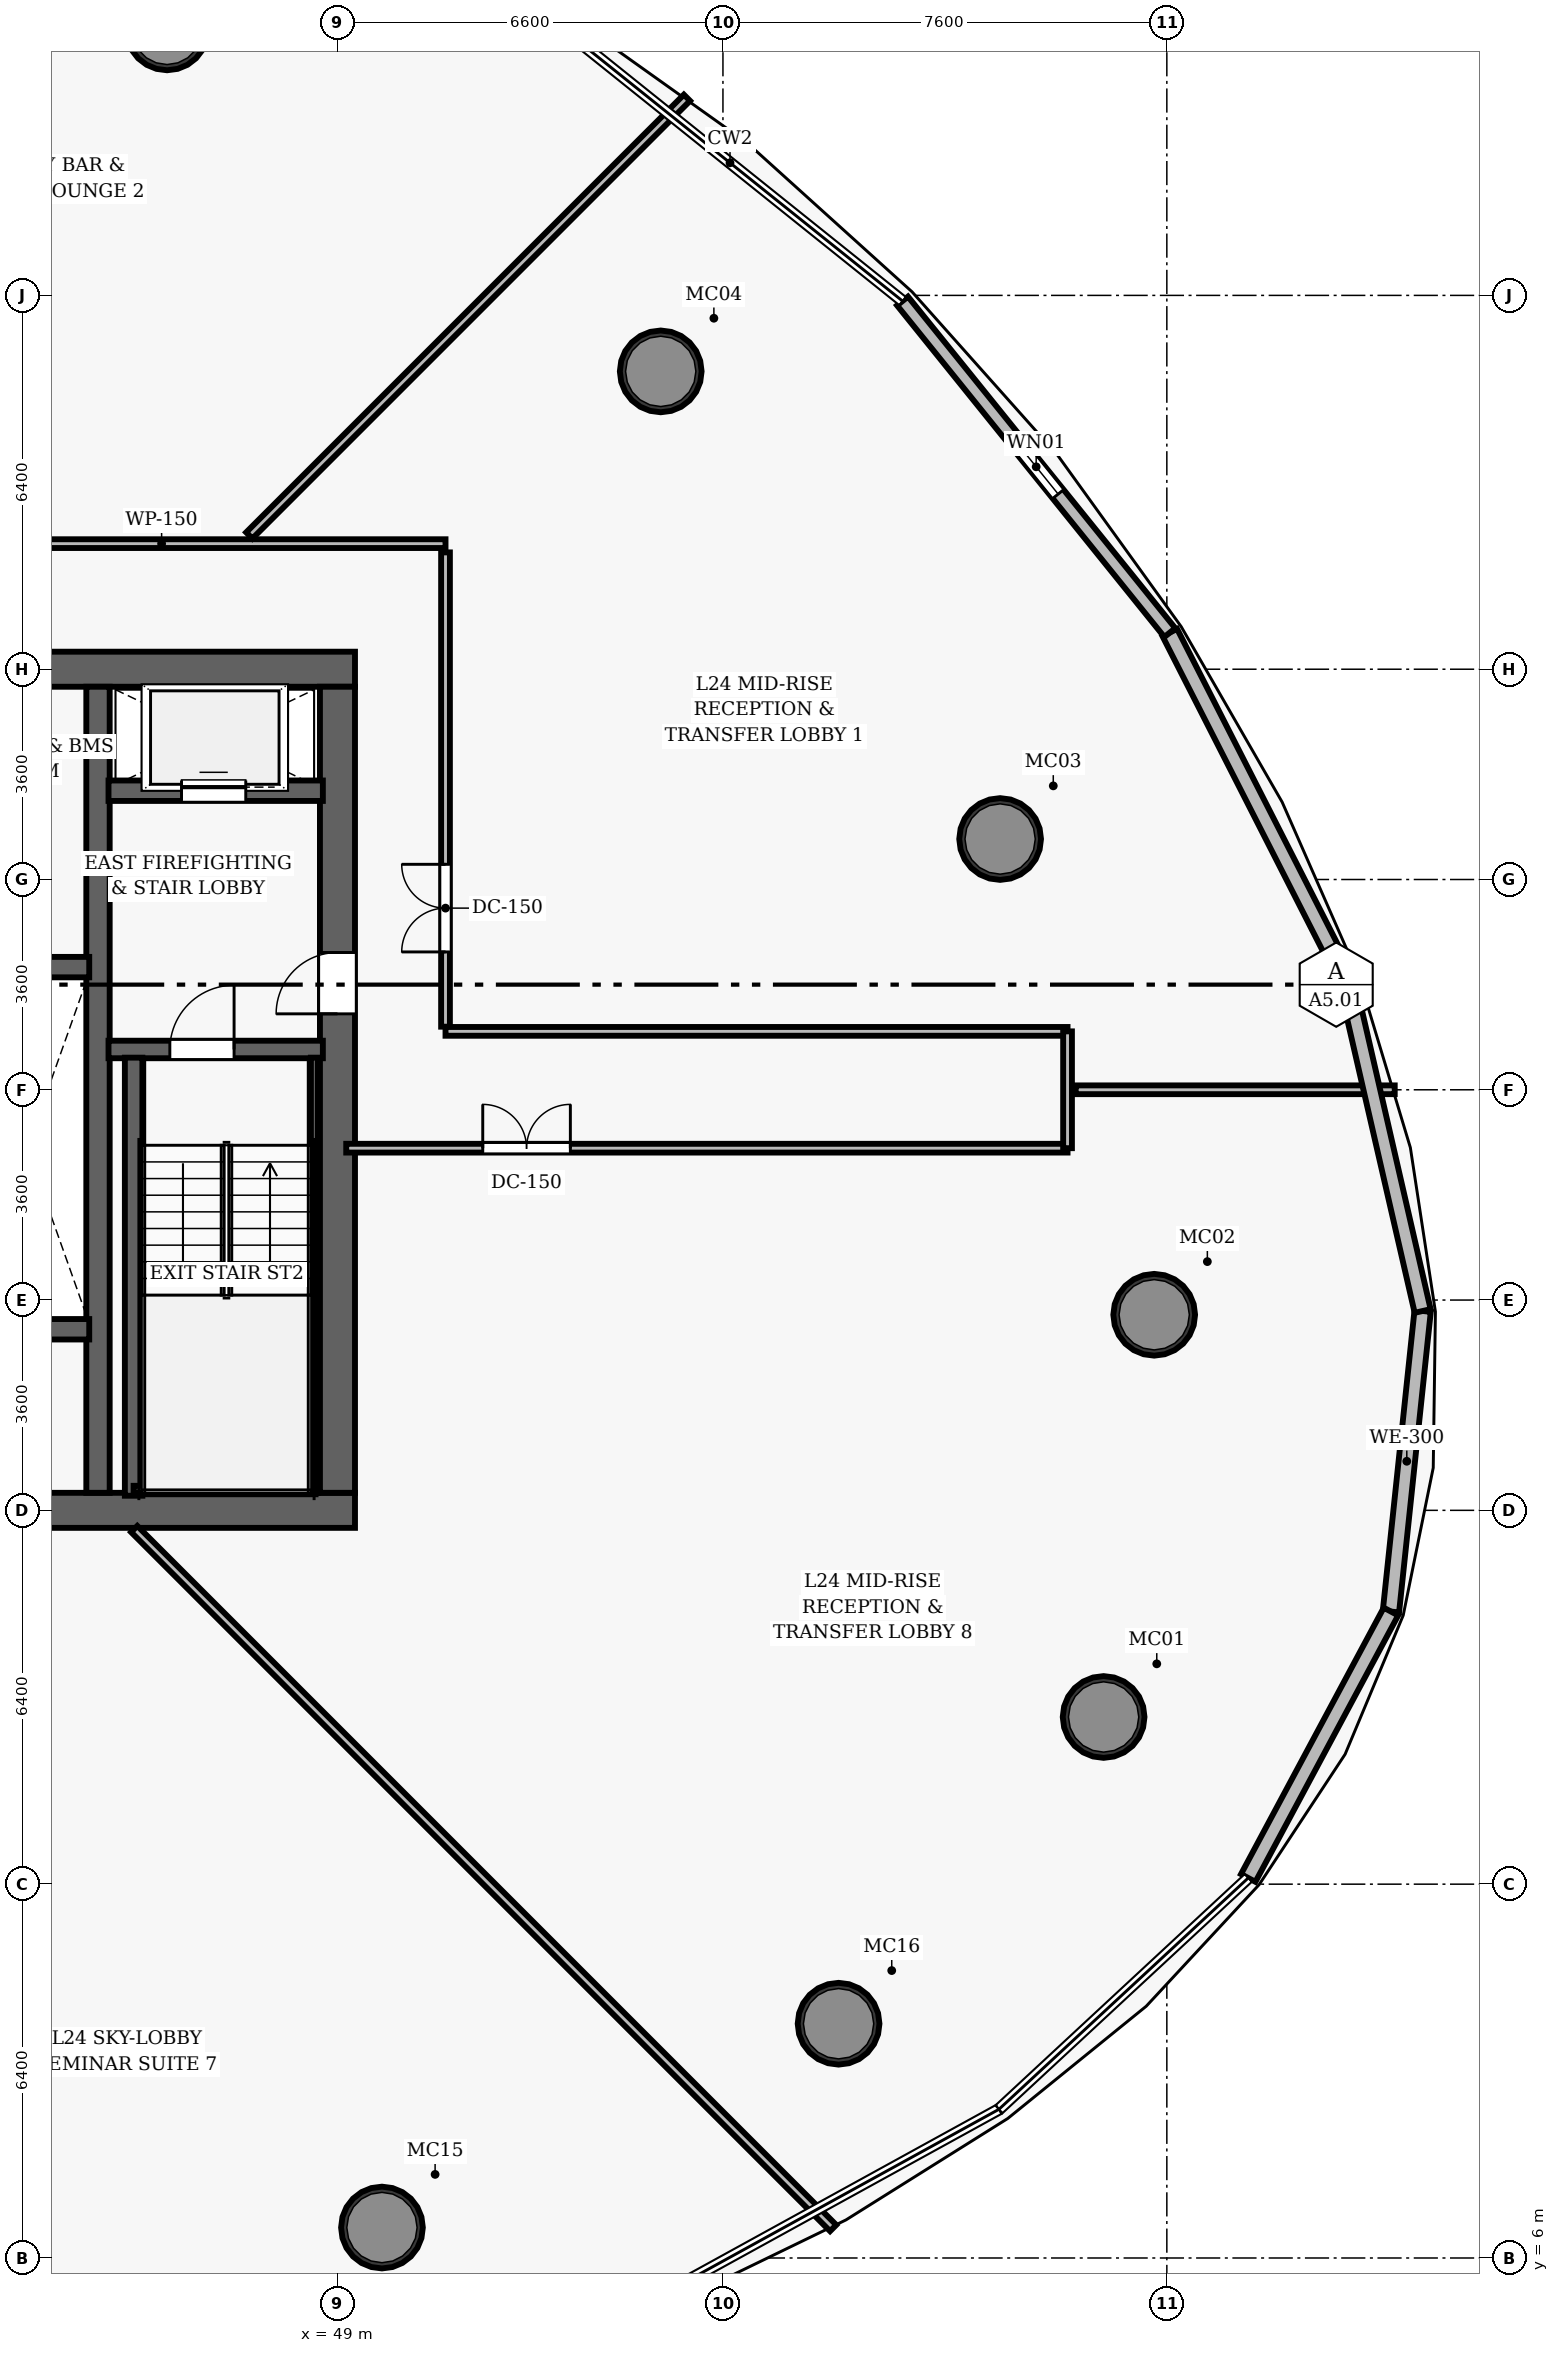
"""IFC4 building model, lengths in metres.
Left out: names, types, materials, properties, quantities, classifications, styles, units other than length and angle.
Written with IfcOpenShell. Run it as: python <this file> out.ifc"""

import sys

from ifc_helpers import new_model, si_unit, direction, frame, frame_2d, origin, origin_2d, place, context, subcontext, project, spatial, rectangle, hollow_circle, extrude, element, fill, save


model = new_model("IFC4")
c1 = context("Model", 3, precision=1e-05, world=origin(), true_north=direction((0.0, 1.0)))
c2 = subcontext(c1, "Body", "Model", "MODEL_VIEW")
j1 = project(units=[si_unit("LENGTHUNIT", "METRE"), si_unit("PLANEANGLEUNIT", "RADIAN")], contexts=[c1])
p1 = place(None, origin())
s1 = spatial("IfcSite", under=j1, at=p1, CompositionType="ELEMENT")
p2 = place(p1, origin())
s2 = spatial("IfcBuilding", under=s1, at=p2, CompositionType="ELEMENT")
p3 = place(p2, frame((0.0, 0.0, 102.8)))
s3 = spatial("IfcBuildingStorey", under=s2, at=p3, CompositionType="ELEMENT", Elevation=102.8)
p4 = place(p3, frame((26.7, 18.8, 0.0), z_axis=(0.0, 0.0, 1.0), x_axis=(1.0, 0.0, 0.0)))
e1 = element("IfcWall", 1, at=p4, inside=s3, PredefinedType="SHEAR", context=c2, shape_type="SweptSolid", body=[
    extrude(rectangle(XDim=22.6, YDim=0.6, at=frame_2d((11.3, 0.0))), origin(), (0.0, 0.0, 1.0), 3.5),
])
p5 = place(p4, frame((14.52, 0.0, 0.0)))
e2 = element("IfcOpeningElement", 2, at=p5, cuts=e1, PredefinedType="OPENING", context=c2, shape_type="SweptSolid", body=[
    extrude(rectangle(XDim=1.05, YDim=2.15, at=frame_2d((0.525, 1.075))), frame((0.0, 0.31, 0.0), z_axis=(0.0, -1.0, 0.0), x_axis=(1.0, 0.0, 0.0)), (0.0, 0.0, 1.0), 0.62),
])
p6 = place(p3, frame((26.7, 33.2, 0.0), z_axis=(0.0, 0.0, 1.0), x_axis=(1.0, 0.0, 0.0)))
e3 = element("IfcWall", 3, at=p6, inside=s3, PredefinedType="SHEAR", context=c2, shape_type="SweptSolid", body=[
    extrude(rectangle(XDim=22.6, YDim=0.6, at=frame_2d((11.3, 0.0))), origin(), (0.0, 0.0, 1.0), 3.5),
])
p7 = place(p6, frame((4.62, 0.0, 0.0)))
e4 = element("IfcOpeningElement", 4, at=p7, cuts=e3, PredefinedType="OPENING", context=c2, shape_type="SweptSolid", body=[
    extrude(rectangle(XDim=1.05, YDim=2.15, at=frame_2d((0.525, 1.075))), frame((0.0, 0.31, 0.0), z_axis=(0.0, -1.0, 0.0), x_axis=(1.0, 0.0, 0.0)), (0.0, 0.0, 1.0), 0.62),
])
p8 = place(p6, frame((14.52, 0.0, 0.0)))
e5 = element("IfcOpeningElement", 5, at=p8, cuts=e3, PredefinedType="OPENING", context=c2, shape_type="SweptSolid", body=[
    extrude(rectangle(XDim=1.05, YDim=2.15, at=frame_2d((0.525, 1.075))), frame((0.0, 0.31, 0.0), z_axis=(0.0, -1.0, 0.0), x_axis=(1.0, 0.0, 0.0)), (0.0, 0.0, 1.0), 0.62),
])
p9 = place(p3, frame((49.0, 19.1, 0.0), z_axis=(0.0, 0.0, 1.0), x_axis=(0.0, 1.0, 0.0)))
e6 = element("IfcWall", 6, at=p9, inside=s3, PredefinedType="SHEAR", context=c2, shape_type="SweptSolid", body=[
    extrude(rectangle(XDim=13.8, YDim=0.6, at=frame_2d((6.9, 0.0))), origin(), (0.0, 0.0, 1.0), 3.5),
])
p10 = place(p9, frame((8.2, 0.0, 0.0)))
e7 = element("IfcOpeningElement", 7, at=p10, cuts=e6, PredefinedType="OPENING", context=c2, shape_type="SweptSolid", body=[
    extrude(rectangle(XDim=1.05, YDim=2.15, at=frame_2d((0.525, 1.075))), frame((0.0, 0.31, 0.0), z_axis=(0.0, -1.0, 0.0), x_axis=(1.0, 0.0, 0.0)), (0.0, 0.0, 1.0), 0.62),
])
p11 = place(p3, frame((44.9, 19.1, 0.0), z_axis=(0.0, 0.0, 1.0), x_axis=(0.0, 1.0, 0.0)))
e8 = element("IfcWall", 8, at=p11, inside=s3, PredefinedType="SHEAR", context=c2, shape_type="SweptSolid", body=[
    extrude(rectangle(XDim=13.8, YDim=0.4, at=frame_2d((6.9, 0.0))), origin(), (0.0, 0.0, 1.0), 3.5),
])
for number, where, z_axis, x_axis in (
    (9, (62.118, 15.262, 0.0), (0.0, 0.0, 1.0), (1.0, 0.0, 0.0)),
    (10, (62.984, 22.148, 0.0), (0.0, 0.0, 1.0), (1.0, 0.0, 0.0)),
    (11, (60.346, 30.293, 0.0), (0.0, 0.0, 1.0), (1.0, 0.0, 0.0)),
    (12, (54.535, 38.299, 0.0), (0.0, 0.0, 1.0), (1.0, 0.0, 0.0)),
    (13, (46.083, 44.154, 0.0), (0.0, 0.0, 1.0), (1.0, 0.0, 0.0)),
    (14, (49.762, 6.521, 0.0), (0.0, 0.0, 1.0), (1.0, 0.0, 0.0)),
    (15, (57.58, 10.011, 0.0), (0.0, 0.0, 1.0), (1.0, 0.0, 0.0)),
):
    element("IfcColumn", number, at=place(p3, frame(where, z_axis=z_axis, x_axis=x_axis)), inside=s3, PredefinedType="COLUMN", context=c2, shape_type="SweptSolid", body=[
        extrude(hollow_circle(Radius=0.7, WallThickness=0.055, at=origin_2d()), origin(), (0.0, 0.0, 1.0), 3.5),
    ])
p12 = place(p3, frame((45.08, 26.69, 0.0), z_axis=(0.0, 0.0, 1.0), x_axis=(1.0, 0.0, 0.0)))
e16 = element("IfcWall", 16, at=p12, inside=s3, PredefinedType="SHEAR", context=c2, shape_type="SweptSolid", body=[
    extrude(rectangle(XDim=3.67, YDim=0.3, at=frame_2d((1.835, 0.0))), origin(), (0.0, 0.0, 1.0), 3.5),
])
p13 = place(p12, frame((1.05, 0.0, 0.0)))
e17 = element("IfcOpeningElement", 17, at=p13, cuts=e16, PredefinedType="OPENING", context=c2, shape_type="SweptSolid", body=[
    extrude(rectangle(XDim=1.1, YDim=2.15, at=frame_2d((0.55, 1.075))), frame((0.0, 0.16, 0.0), z_axis=(0.0, -1.0, 0.0), x_axis=(1.0, 0.0, 0.0)), (0.0, 0.0, 1.0), 0.32),
])
p14 = place(p3, frame((45.51, 19.05, 0.0), z_axis=(0.0, 0.0, 1.0), x_axis=(0.0, 1.0, 0.0)))
e18 = element("IfcWall", 18, at=p14, inside=s3, PredefinedType="SHEAR", context=c2, shape_type="SweptSolid", body=[
    extrude(rectangle(XDim=7.5, YDim=0.3, at=frame_2d((3.75, 0.0))), origin(), (0.0, 0.0, 1.0), 3.5),
])
p15 = place(p3, frame((48.605, 19.1, 0.0), z_axis=(0.0, 0.0, 1.0), x_axis=(0.0, 1.0, 0.0)))
e19 = element("IfcWall", 19, at=p15, inside=s3, PredefinedType="SHEAR", context=c2, shape_type="SweptSolid", body=[
    extrude(rectangle(XDim=7.45, YDim=0.12, at=frame_2d((3.725, 0.0))), origin(), (0.0, 0.0, 1.0), 3.5),
])
p16 = place(p3, frame((45.51, 19.16, 0.0), z_axis=(0.0, 0.0, 1.0), x_axis=(1.0, 0.0, 0.0)))
e20 = element("IfcWall", 20, at=p16, inside=s3, PredefinedType="SHEAR", context=c2, shape_type="SweptSolid", body=[
    extrude(rectangle(XDim=3.095, YDim=0.12, at=frame_2d((1.547, 0.0))), origin(), (0.0, 0.0, 1.0), 3.5),
])
p17 = place(p3, frame((45.08, 31.12, 0.0), z_axis=(0.0, 0.0, 1.0), x_axis=(1.0, 0.0, 0.0)))
e21 = element("IfcWall", 21, at=p17, inside=s3, PredefinedType="SHEAR", context=c2, shape_type="SweptSolid", body=[
    extrude(rectangle(XDim=3.67, YDim=0.35, at=frame_2d((1.835, 0.0))), origin(), (0.0, 0.0, 1.0), 2.675),
])
p18 = place(p17, frame((1.25, 0.0, 0.0)))
e22 = element("IfcOpeningElement", 22, at=p18, cuts=e21, PredefinedType="OPENING", context=c2, shape_type="SweptSolid", body=[
    extrude(rectangle(XDim=1.1, YDim=2.15, at=frame_2d((0.55, 1.075))), frame((0.0, 0.185, 0.0), z_axis=(0.0, -1.0, 0.0), x_axis=(1.0, 0.0, 0.0)), (0.0, 0.0, 1.0), 0.37),
])
for number, where, z_axis, x_axis in (
    (23, (42.72, 21.9, 0.0), (0.0, 0.0, 1.0), (1.0, 0.0, 0.0)),
    (24, (42.72, 28.1, 0.0), (0.0, 0.0, 1.0), (1.0, 0.0, 0.0)),
):
    element("IfcWall", number, at=place(p3, frame(where, z_axis=z_axis, x_axis=x_axis)), inside=s3, PredefinedType="SHEAR", context=c2, shape_type="SweptSolid", body=[
        extrude(rectangle(XDim=2.03, YDim=0.35, at=frame_2d((1.015, 0.0))), origin(), (0.0, 0.0, 1.0), 2.675),
    ])
p19 = place(p3, frame((24.85, 35.35, 0.0), z_axis=(0.0, 0.0, 1.0), x_axis=(1.0, 0.0, 0.0)))
e25 = element("IfcWall", 25, at=p19, inside=s3, PredefinedType="PARTITIONING", context=c2, shape_type="SweptSolid", body=[
    extrude(rectangle(XDim=26.0, YDim=0.15, at=frame_2d((13.0, 0.0))), origin(), (0.0, 0.0, 1.0), 2.675),
])
p20 = place(p19, frame((14.628, 0.0, 0.0)))
e26 = element("IfcOpeningElement", 26, at=p20, cuts=e25, PredefinedType="OPENING", context=c2, shape_type="SweptSolid", body=[
    extrude(rectangle(XDim=1.5, YDim=2.2, at=frame_2d((0.75, 1.1))), frame((0.0, 0.085, 0.0), z_axis=(0.0, -1.0, 0.0), x_axis=(1.0, 0.0, 0.0)), (0.0, 0.0, 1.0), 0.17),
])
p21 = place(p19, frame((6.407, 0.0, 0.0)))
e27 = element("IfcOpeningElement", 27, at=p21, cuts=e25, PredefinedType="OPENING", context=c2, shape_type="SweptSolid", body=[
    extrude(rectangle(XDim=0.95, YDim=2.15, at=frame_2d((0.475, 1.075))), frame((0.0, 0.085, 0.0), z_axis=(0.0, -1.0, 0.0), x_axis=(1.0, 0.0, 0.0)), (0.0, 0.0, 1.0), 0.17),
])
p22 = place(p3, frame((50.85, 27.08, 0.0), z_axis=(0.0, 0.0, 1.0), x_axis=(0.0, 1.0, 0.0)))
e28 = element("IfcWall", 28, at=p22, inside=s3, PredefinedType="PARTITIONING", context=c2, shape_type="SweptSolid", body=[
    extrude(rectangle(XDim=8.12, YDim=0.15, at=frame_2d((4.06, 0.0))), origin(), (0.0, 0.0, 1.0), 2.675),
])
p23 = place(p22, frame((1.28, 0.0, 0.0)))
e29 = element("IfcOpeningElement", 29, at=p23, cuts=e28, PredefinedType="OPENING", context=c2, shape_type="SweptSolid", body=[
    extrude(rectangle(XDim=1.5, YDim=2.2, at=frame_2d((0.75, 1.1))), frame((0.0, 0.085, 0.0), z_axis=(0.0, -1.0, 0.0), x_axis=(1.0, 0.0, 0.0)), (0.0, 0.0, 1.0), 0.17),
])
p24 = place(p3, frame((50.85, 27.0, 0.0), z_axis=(0.0, 0.0, 1.0), x_axis=(1.0, 0.0, 0.0)))
e30 = element("IfcWall", 30, at=p24, inside=s3, PredefinedType="PARTITIONING", context=c2, shape_type="SweptSolid", body=[
    extrude(rectangle(XDim=10.65, YDim=0.15, at=frame_2d((5.325, 0.0))), origin(), (0.0, 0.0, 1.0), 2.675),
])
p25 = place(p3, frame((49.15, 25.0, 0.0), z_axis=(0.0, 0.0, 1.0), x_axis=(1.0, 0.0, 0.0)))
e31 = element("IfcWall", 31, at=p25, inside=s3, PredefinedType="PARTITIONING", context=c2, shape_type="SweptSolid", body=[
    extrude(rectangle(XDim=12.35, YDim=0.15, at=frame_2d((6.175, 0.0))), origin(), (0.0, 0.0, 1.0), 2.675),
])
p26 = place(p25, frame((2.337, 0.0, 0.0)))
e32 = element("IfcOpeningElement", 32, at=p26, cuts=e31, PredefinedType="OPENING", context=c2, shape_type="SweptSolid", body=[
    extrude(rectangle(XDim=1.5, YDim=2.2, at=frame_2d((0.75, 1.1))), frame((0.0, 0.085, 0.0), z_axis=(0.0, -1.0, 0.0), x_axis=(1.0, 0.0, 0.0)), (0.0, 0.0, 1.0), 0.17),
])
p27 = place(p3, frame((61.5, 25.0, 0.0), z_axis=(0.0, 0.0, 1.0), x_axis=(0.0, 1.0, 0.0)))
e33 = element("IfcWall", 33, at=p27, inside=s3, PredefinedType="PARTITIONING", context=c2, shape_type="SweptSolid", body=[
    extrude(rectangle(XDim=2.0, YDim=0.15, at=frame_2d((1.0, 0.0))), origin(), (0.0, 0.0, 1.0), 2.675),
])
p28 = place(p3, frame((61.64, 26.0, 0.0), z_axis=(0.0, 0.0, 1.0), x_axis=(1.0, 0.0, 0.0)))
e34 = element("IfcWall", 34, at=p28, inside=s3, PredefinedType="PARTITIONING", context=c2, shape_type="SweptSolid", body=[
    extrude(rectangle(XDim=5.462, YDim=0.15, at=frame_2d((2.731, 0.0))), origin(), (0.0, 0.0, 1.0), 2.675),
])
p29 = place(p3, frame((47.49, 35.49, 0.0), z_axis=(0.0, 0.0, 1.0), x_axis=(0.707106781187, 0.707106781187, 0.0)))
e35 = element("IfcWall", 35, at=p29, inside=s3, PredefinedType="PARTITIONING", context=c2, shape_type="SweptSolid", body=[
    extrude(rectangle(XDim=10.598, YDim=0.15, at=frame_2d((5.299, 0.0))), origin(), (0.0, 0.0, 1.0), 2.675),
])
p30 = place(p3, frame((45.52, 18.48, 0.0), z_axis=(0.0, 0.0, 1.0), x_axis=(0.707106781187, -0.707106781187, 0.0)))
e36 = element("IfcWall", 36, at=p30, inside=s3, PredefinedType="PARTITIONING", context=c2, shape_type="SweptSolid", body=[
    extrude(rectangle(XDim=16.924, YDim=0.15, at=frame_2d((8.462, 0.0))), origin(), (0.0, 0.0, 1.0), 2.675),
])
p31 = place(p3, frame((67.58, 22.213, 0.0), z_axis=(0.0, 0.0, 1.0), x_axis=(-0.104888640348, -0.994483973288, 0.0)))
e37 = element("IfcWall", 37, at=p31, inside=s3, PredefinedType="SOLIDWALL", context=c2, shape_type="SweptSolid", body=[
    extrude(rectangle(XDim=5.174, YDim=0.28, at=frame_2d((2.587, 0.0))), origin(), (0.0, 0.0, 1.0), 3.26),
])
p32 = place(p3, frame((66.276, 27.888, 0.0), z_axis=(0.0, 0.0, 1.0), x_axis=(0.223983622279, -0.974592908322, 0.0)))
e38 = element("IfcWall", 38, at=p32, inside=s3, PredefinedType="SOLIDWALL", context=c2, shape_type="SweptSolid", body=[
    extrude(rectangle(XDim=5.823, YDim=0.28, at=frame_2d((2.911, 0.0))), origin(), (0.0, 0.0, 1.0), 3.26),
])
p33 = place(p3, frame((63.251, 33.827, 0.0), z_axis=(0.0, 0.0, 1.0), x_axis=(0.45378036064, -0.891113564198, 0.0)))
e39 = element("IfcWall", 39, at=p33, inside=s3, PredefinedType="SOLIDWALL", context=c2, shape_type="SweptSolid", body=[
    extrude(rectangle(XDim=6.665, YDim=0.28, at=frame_2d((3.333, 0.0))), origin(), (0.0, 0.0, 1.0), 3.26),
])
p34 = place(p3, frame((58.675, 39.504, 0.0), z_axis=(0.0, 0.0, 1.0), x_axis=(0.627622215331, -0.778518050416, 0.0)))
e40 = element("IfcWall", 40, at=p34, inside=s3, PredefinedType="SOLIDWALL", context=c2, shape_type="SweptSolid", body=[
    extrude(rectangle(XDim=7.292, YDim=0.24, at=frame_2d((3.646, 0.0))), origin(), (0.0, 0.0, 1.0), 3.26),
])
p35 = place(p34, frame((3.046, 0.0, 0.85)))
e41 = element("IfcOpeningElement", 41, at=p35, cuts=e40, PredefinedType="OPENING", context=c2, shape_type="SweptSolid", body=[
    extrude(rectangle(XDim=1.2, YDim=1.6, at=frame_2d((0.6, 0.8))), frame((0.0, 0.13, 0.0), z_axis=(0.0, -1.0, 0.0), x_axis=(1.0, 0.0, 0.0)), (0.0, 0.0, 1.0), 0.26),
])
p36 = place(p3, frame((67.037, 17.067, 0.0), z_axis=(0.0, 0.0, 1.0), x_axis=(-0.472250217472, -0.881464538196, 0.0)))
e42 = element("IfcWall", 42, at=p36, inside=s3, PredefinedType="SOLIDWALL", context=c2, shape_type="SweptSolid", body=[
    extrude(rectangle(XDim=5.174, YDim=0.28, at=frame_2d((2.587, 0.0))), origin(), (0.0, 0.0, 1.0), 3.26),
])
p37 = place(p13, origin())
e43 = element("IfcDoor", 43, at=p37, inside=s3, OperationType="SINGLE_SWING_RIGHT", PredefinedType="DOOR", context=c2, shape_type="SweptSolid", body=[
    extrude(rectangle(XDim=1.1, YDim=2.15, at=frame_2d((0.55, 1.075))), frame((0.0, 0.025, 0.0), z_axis=(0.0, -1.0, 0.0), x_axis=(1.0, 0.0, 0.0)), (0.0, 0.0, 1.0), 0.05),
])
fill(e17, e43)
p38 = place(p10, origin())
e44 = element("IfcDoor", 44, at=p38, inside=s3, OperationType="SINGLE_SWING_LEFT", PredefinedType="DOOR", context=c2, shape_type="SweptSolid", body=[
    extrude(rectangle(XDim=1.05, YDim=2.15, at=frame_2d((0.525, 1.075))), frame((0.0, 0.025, 0.0), z_axis=(0.0, -1.0, 0.0), x_axis=(1.0, 0.0, 0.0)), (0.0, 0.0, 1.0), 0.05),
])
fill(e7, e44)
p39 = place(p23, origin())
e45 = element("IfcDoor", 45, at=p39, inside=s3, OperationType="DOUBLE_DOOR_SINGLE_SWING", PredefinedType="DOOR", context=c2, shape_type="SweptSolid", body=[
    extrude(rectangle(XDim=1.5, YDim=2.2, at=frame_2d((0.75, 1.1))), frame((0.0, 0.025, 0.0), z_axis=(0.0, -1.0, 0.0), x_axis=(1.0, 0.0, 0.0)), (0.0, 0.0, 1.0), 0.05),
])
fill(e29, e45)
p40 = place(p26, origin())
e46 = element("IfcDoor", 46, at=p40, inside=s3, OperationType="DOUBLE_DOOR_SINGLE_SWING", PredefinedType="DOOR", context=c2, shape_type="SweptSolid", body=[
    extrude(rectangle(XDim=1.5, YDim=2.2, at=frame_2d((0.75, 1.1))), frame((0.0, 0.025, 0.0), z_axis=(0.0, -1.0, 0.0), x_axis=(1.0, 0.0, 0.0)), (0.0, 0.0, 1.0), 0.05),
])
fill(e32, e46)
p41 = place(p18, origin())
e47 = element("IfcDoor", 47, at=p41, inside=s3, OperationType="SLIDING_TO_LEFT", PredefinedType="DOOR", context=c2, shape_type="SweptSolid", body=[
    extrude(rectangle(XDim=1.1, YDim=2.15, at=frame_2d((0.55, 1.075))), frame((0.0, 0.025, 0.0), z_axis=(0.0, -1.0, 0.0), x_axis=(1.0, 0.0, 0.0)), (0.0, 0.0, 1.0), 0.05),
])
fill(e22, e47)
p42 = place(p35, origin())
e48 = element("IfcWindow", 48, at=p42, inside=s3, PartitioningType="SINGLE_PANEL", PredefinedType="WINDOW", context=c2, shape_type="SweptSolid", body=[
    extrude(rectangle(XDim=1.2, YDim=1.6, at=frame_2d((0.6, 0.8))), frame((0.0, 0.03, 0.0), z_axis=(0.0, -1.0, 0.0), x_axis=(1.0, 0.0, 0.0)), (0.0, 0.0, 1.0), 0.06),
])
fill(e41, e48)
save(model, sys.argv[1])
